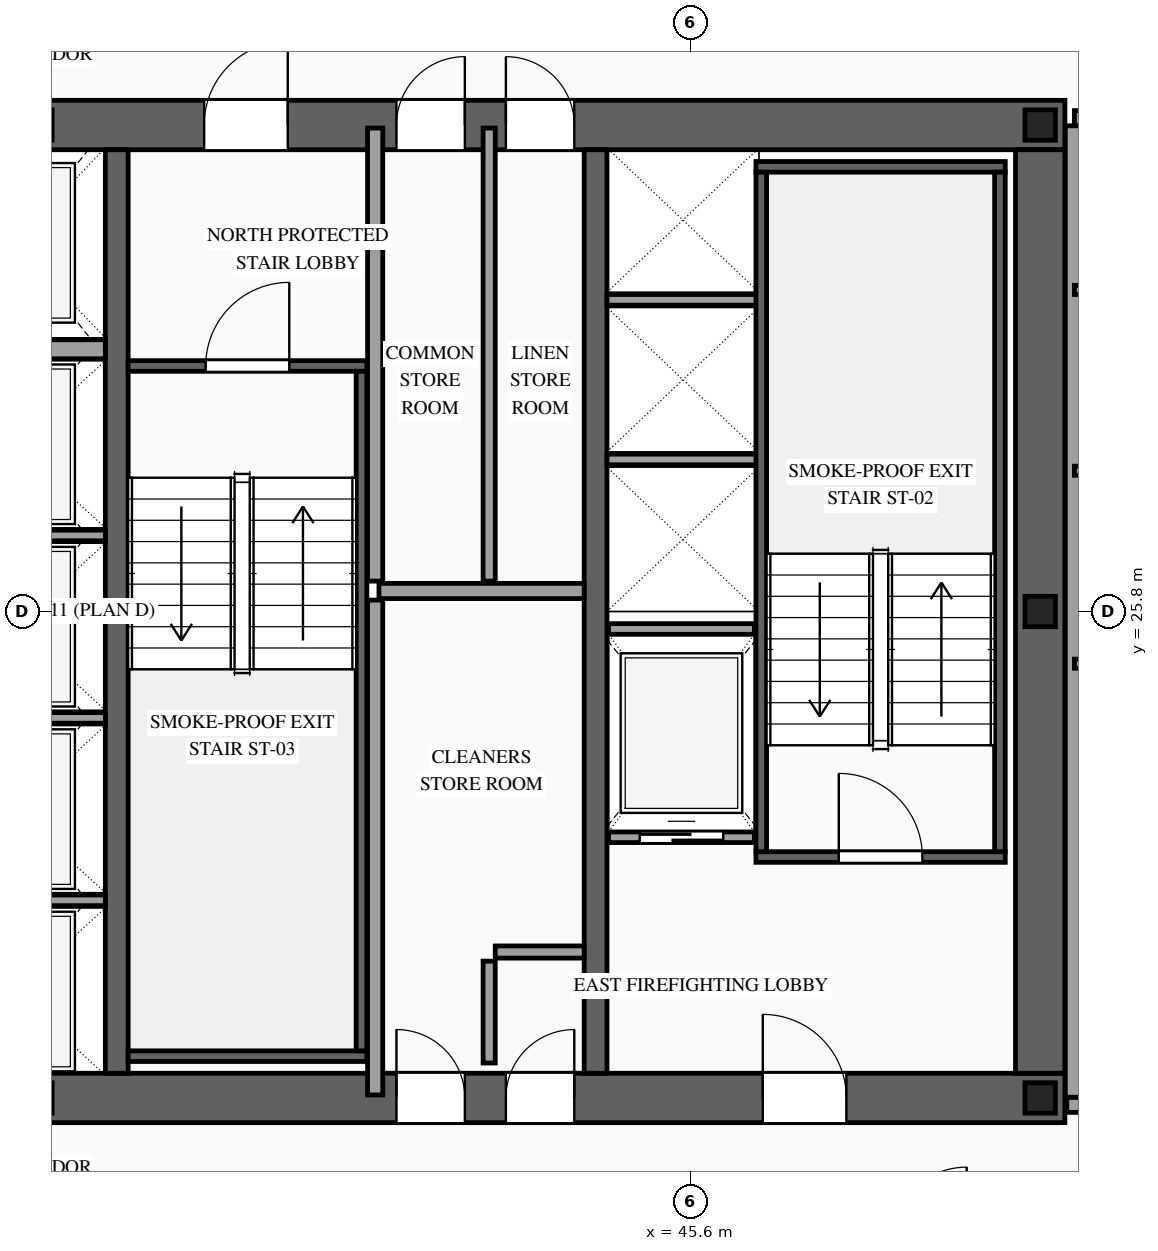
"""IFC4 building model, lengths in metres.
Left out: names, types, materials, properties, quantities, classifications, styles, units other than length and angle.
Written with IfcOpenShell. Run it as: python <this file> out.ifc"""

import sys

from ifc_helpers import new_model, si_unit, direction, frame, frame_2d, origin, origin_2d, place, context, subcontext, project, spatial, rectangle, i_section, extrude, source, transform, mapped, element, fill, save


model = new_model("IFC4")
c1 = context("Model", 3, precision=1e-05, world=origin(), true_north=direction((0.0, 1.0)))
c2 = subcontext(c1, "Body", "Model", "MODEL_VIEW")
j1 = project(units=[si_unit("LENGTHUNIT", "METRE"), si_unit("PLANEANGLEUNIT", "RADIAN")], contexts=[c1])
p1 = place(None, origin())
s1 = spatial("IfcSite", under=j1, at=p1, CompositionType="ELEMENT")
p2 = place(p1, origin())
s2 = spatial("IfcBuilding", under=s1, at=p2, CompositionType="ELEMENT")
p3 = place(p2, frame((0.0, 0.0, 198.5)))
s3 = spatial("IfcBuildingStorey", under=s2, at=p3, CompositionType="ELEMENT", Elevation=198.5)
p4 = place(p3, frame((23.475, 19.4, 0.0), z_axis=(0.0, 0.0, 1.0), x_axis=(1.0, 0.0, 0.0)))
e1 = element("IfcWall", 1, at=p4, inside=s3, PredefinedType="SHEAR", context=c2, shape_type="SweptSolid", body=[
    extrude(rectangle(XDim=27.05, YDim=0.65, at=frame_2d((13.525, 0.0))), origin(), (0.0, 0.0, 1.0), 3.5),
])
p5 = place(p4, frame((1.975, 0.0, 0.0)))
e2 = element("IfcOpeningElement", 2, at=p5, cuts=e1, PredefinedType="OPENING", context=c2, shape_type="SweptSolid", body=[
    extrude(rectangle(XDim=1.1, YDim=2.2, at=frame_2d((0.55, 1.1))), frame((0.0, 0.34, 0.0), z_axis=(0.0, -1.0, 0.0), x_axis=(1.0, 0.0, 0.0)), (0.0, 0.0, 1.0), 0.68),
])
p6 = place(p4, frame((9.875, 0.0, 0.0)))
e3 = element("IfcOpeningElement", 3, at=p6, cuts=e1, PredefinedType="OPENING", context=c2, shape_type="SweptSolid", body=[
    extrude(rectangle(XDim=1.1, YDim=2.2, at=frame_2d((0.55, 1.1))), frame((0.0, 0.34, 0.0), z_axis=(0.0, -1.0, 0.0), x_axis=(1.0, 0.0, 0.0)), (0.0, 0.0, 1.0), 0.68),
])
p7 = place(p4, frame((23.075, 0.0, 0.0)))
e4 = element("IfcOpeningElement", 4, at=p7, cuts=e1, PredefinedType="OPENING", context=c2, shape_type="SweptSolid", body=[
    extrude(rectangle(XDim=1.1, YDim=2.2, at=frame_2d((0.55, 1.1))), frame((0.0, 0.34, 0.0), z_axis=(0.0, -1.0, 0.0), x_axis=(1.0, 0.0, 0.0)), (0.0, 0.0, 1.0), 0.68),
])
p8 = place(p4, frame((19.695, 0.0, 0.0)))
e5 = element("IfcOpeningElement", 5, at=p8, cuts=e1, PredefinedType="OPENING", context=c2, shape_type="SweptSolid", body=[
    extrude(rectangle(XDim=0.9, YDim=2.15, at=frame_2d((0.45, 1.075))), frame((0.0, 0.34, 0.0), z_axis=(0.0, -1.0, 0.0), x_axis=(1.0, 0.0, 0.0)), (0.0, 0.0, 1.0), 0.68),
])
p9 = place(p4, frame((18.255, 0.0, 0.0)))
e6 = element("IfcOpeningElement", 6, at=p9, cuts=e1, PredefinedType="OPENING", context=c2, shape_type="SweptSolid", body=[
    extrude(rectangle(XDim=0.9, YDim=2.15, at=frame_2d((0.45, 1.075))), frame((0.0, 0.34, 0.0), z_axis=(0.0, -1.0, 0.0), x_axis=(1.0, 0.0, 0.0)), (0.0, 0.0, 1.0), 0.68),
])
p10 = place(p3, frame((23.475, 32.2, 0.0), z_axis=(0.0, 0.0, 1.0), x_axis=(1.0, 0.0, 0.0)))
e7 = element("IfcWall", 7, at=p10, inside=s3, PredefinedType="SHEAR", context=c2, shape_type="SweptSolid", body=[
    extrude(rectangle(XDim=27.05, YDim=0.65, at=frame_2d((13.525, 0.0))), origin(), (0.0, 0.0, 1.0), 3.5),
])
p11 = place(p10, frame((4.595, 0.0, 0.0)))
e8 = element("IfcOpeningElement", 8, at=p11, cuts=e7, PredefinedType="OPENING", context=c2, shape_type="SweptSolid", body=[
    extrude(rectangle(XDim=0.9, YDim=2.15, at=frame_2d((0.45, 1.075))), frame((0.0, 0.34, 0.0), z_axis=(0.0, -1.0, 0.0), x_axis=(1.0, 0.0, 0.0)), (0.0, 0.0, 1.0), 0.68),
])
p12 = place(p10, frame((9.875, 0.0, 0.0)))
e9 = element("IfcOpeningElement", 9, at=p12, cuts=e7, PredefinedType="OPENING", context=c2, shape_type="SweptSolid", body=[
    extrude(rectangle(XDim=1.1, YDim=2.2, at=frame_2d((0.55, 1.1))), frame((0.0, 0.34, 0.0), z_axis=(0.0, -1.0, 0.0), x_axis=(1.0, 0.0, 0.0)), (0.0, 0.0, 1.0), 0.68),
])
p13 = place(p10, frame((15.725, 0.0, 0.0)))
e10 = element("IfcOpeningElement", 10, at=p13, cuts=e7, PredefinedType="OPENING", context=c2, shape_type="SweptSolid", body=[
    extrude(rectangle(XDim=1.1, YDim=2.2, at=frame_2d((0.55, 1.1))), frame((0.0, 0.34, 0.0), z_axis=(0.0, -1.0, 0.0), x_axis=(1.0, 0.0, 0.0)), (0.0, 0.0, 1.0), 0.68),
])
p14 = place(p10, frame((18.255, 0.0, 0.0)))
e11 = element("IfcOpeningElement", 11, at=p14, cuts=e7, PredefinedType="OPENING", context=c2, shape_type="SweptSolid", body=[
    extrude(rectangle(XDim=0.9, YDim=2.15, at=frame_2d((0.45, 1.075))), frame((0.0, 0.34, 0.0), z_axis=(0.0, -1.0, 0.0), x_axis=(1.0, 0.0, 0.0)), (0.0, 0.0, 1.0), 0.68),
])
p15 = place(p10, frame((19.695, 0.0, 0.0)))
e12 = element("IfcOpeningElement", 12, at=p15, cuts=e7, PredefinedType="OPENING", context=c2, shape_type="SweptSolid", body=[
    extrude(rectangle(XDim=0.9, YDim=2.15, at=frame_2d((0.45, 1.075))), frame((0.0, 0.34, 0.0), z_axis=(0.0, -1.0, 0.0), x_axis=(1.0, 0.0, 0.0)), (0.0, 0.0, 1.0), 0.68),
])
m1 = source(origin(), c2, "Body", "SweptSolid", [
    extrude(rectangle(XDim=12.15, YDim=0.65, at=frame_2d((6.075, 0.0))), origin(), (0.0, 0.0, 1.0), 3.5),
])
p16 = place(p3, frame((50.2, 19.725, 0.0), z_axis=(0.0, 0.0, 1.0), x_axis=(0.0, 1.0, 0.0)))
e13 = element("IfcWall", 13, at=p16, inside=s3, PredefinedType="SHEAR", context=c2, shape_type="MappedRepresentation", body=[
    mapped(m1, transform((0.0, 0.0, 0.0), scale=1.0)),
])
m2 = source(origin(), c2, "Body", "SweptSolid", [
    extrude(rectangle(XDim=12.15, YDim=0.3, at=frame_2d((6.075, 0.0))), origin(), (0.0, 0.0, 1.0), 3.5),
])
for number, where, z_axis, x_axis in (
    (14, (38.05, 19.725, 0.0), (0.0, 0.0, 1.0), (0.0, 1.0, 0.0)),
    (15, (44.35, 19.725, 0.0), (0.0, 0.0, 1.0), (0.0, 1.0, 0.0)),
):
    element("IfcWall", number, at=place(p3, frame(where, z_axis=z_axis, x_axis=x_axis)), inside=s3, PredefinedType="SOLIDWALL", context=c2, shape_type="MappedRepresentation", body=[
        mapped(m2, transform((0.0, 0.0, 0.0), scale=1.0)),
    ])
m3 = source(origin(), c2, "Body", "SweptSolid", [
    extrude(i_section(OverallWidth=0.4, OverallDepth=0.4, WebThickness=0.013, FlangeThickness=0.021, at=origin_2d()), origin(), (0.0, 0.0, 1.0), 3.5),
])
for number, where, z_axis, x_axis in (
    (16, (50.2, 19.4, 0.0), (0.0, 0.0, 1.0), (1.0, 0.0, 0.0)),
    (17, (50.2, 25.8, 0.0), (0.0, 0.0, 1.0), (1.0, 0.0, 0.0)),
    (18, (50.2, 32.2, 0.0), (0.0, 0.0, 1.0), (1.0, 0.0, 0.0)),
):
    element("IfcColumn", number, at=place(p3, frame(where, z_axis=z_axis, x_axis=x_axis)), inside=s3, PredefinedType="COLUMN", context=c2, shape_type="MappedRepresentation", body=[
        mapped(m3, transform((0.0, 0.0, 0.0), scale=1.0)),
    ])
p17 = place(p3, frame((44.52, 22.83, 0.0), z_axis=(0.0, 0.0, 1.0), x_axis=(1.0, 0.0, 0.0)))
e19 = element("IfcWall", 19, at=p17, inside=s3, PredefinedType="SOLIDWALL", context=c2, shape_type="SweptSolid", body=[
    extrude(rectangle(XDim=1.92, YDim=0.14, at=frame_2d((0.96, 0.0))), origin(), (0.0, 0.0, 1.0), 3.28),
])
p18 = place(p17, frame((0.41, 0.0, 0.0)))
e20 = element("IfcOpeningElement", 20, at=p18, cuts=e19, PredefinedType="OPENING", context=c2, shape_type="SweptSolid", body=[
    extrude(rectangle(XDim=1.1, YDim=2.2, at=frame_2d((0.55, 1.1))), frame((0.0, 0.085, 0.0), z_axis=(0.0, -1.0, 0.0), x_axis=(1.0, 0.0, 0.0)), (0.0, 0.0, 1.0), 0.17),
])
m4 = source(origin(), c2, "Body", "SweptSolid", [
    extrude(rectangle(XDim=1.92, YDim=0.14, at=frame_2d((0.96, 0.0))), origin(), (0.0, 0.0, 1.0), 3.28),
])
p19 = place(p3, frame((44.52, 25.57, 0.0), z_axis=(0.0, 0.0, 1.0), x_axis=(1.0, 0.0, 0.0)))
e21 = element("IfcWall", 21, at=p19, inside=s3, PredefinedType="SOLIDWALL", context=c2, shape_type="MappedRepresentation", body=[
    mapped(m4, transform((0.0, 0.0, 0.0), scale=1.0)),
])
m5 = source(origin(), c2, "Body", "SweptSolid", [
    extrude(rectangle(XDim=2.4, YDim=0.14, at=frame_2d((1.2, 0.0))), origin(), (0.0, 0.0, 1.0), 3.28),
])
for number, where, z_axis, x_axis in (
    (22, (35.5, 22.0, 0.0), (0.0, 0.0, 1.0), (1.0, 0.0, 0.0)),
    (23, (35.5, 24.4, 0.0), (0.0, 0.0, 1.0), (1.0, 0.0, 0.0)),
    (24, (35.5, 26.8, 0.0), (0.0, 0.0, 1.0), (1.0, 0.0, 0.0)),
):
    element("IfcWall", number, at=place(p3, frame(where, z_axis=z_axis, x_axis=x_axis)), inside=s3, PredefinedType="SOLIDWALL", context=c2, shape_type="MappedRepresentation", body=[
        mapped(m5, transform((0.0, 0.0, 0.0), scale=1.0)),
    ])
m6 = source(origin(), c2, "Body", "SweptSolid", [
    extrude(rectangle(XDim=2.4, YDim=0.25, at=frame_2d((1.2, 0.0))), origin(), (0.0, 0.0, 1.0), 3.28),
])
p20 = place(p3, frame((35.5, 29.25, 0.0), z_axis=(0.0, 0.0, 1.0), x_axis=(1.0, 0.0, 0.0)))
e25 = element("IfcWall", 25, at=p20, inside=s3, PredefinedType="SOLIDWALL", context=c2, shape_type="MappedRepresentation", body=[
    mapped(m6, transform((0.0, 0.0, 0.0), scale=1.0)),
])
m7 = source(origin(), c2, "Body", "SweptSolid", [
    extrude(rectangle(XDim=2.0, YDim=0.14, at=frame_2d((1.0, 0.0))), origin(), (0.0, 0.0, 1.0), 3.28),
])
for number, where, z_axis, x_axis in (
    (26, (44.5, 27.8, 0.0), (0.0, 0.0, 1.0), (1.0, 0.0, 0.0)),
    (27, (44.5, 29.9, 0.0), (0.0, 0.0, 1.0), (1.0, 0.0, 0.0)),
):
    element("IfcWall", number, at=place(p3, frame(where, z_axis=z_axis, x_axis=x_axis)), inside=s3, PredefinedType="SOLIDWALL", context=c2, shape_type="MappedRepresentation", body=[
        mapped(m7, transform((0.0, 0.0, 0.0), scale=1.0)),
    ])
p21 = place(p3, frame((46.46, 22.57, 0.0), z_axis=(0.0, 0.0, 1.0), x_axis=(1.0, 0.0, 0.0)))
e28 = element("IfcWall", 28, at=p21, inside=s3, PredefinedType="SOLIDWALL", context=c2, shape_type="SweptSolid", body=[
    extrude(rectangle(XDim=3.28, YDim=0.14, at=frame_2d((1.64, 0.0))), origin(), (0.0, 0.0, 1.0), 3.28),
])
p22 = place(p21, frame((1.09, 0.0, 0.0)))
e29 = element("IfcOpeningElement", 29, at=p22, cuts=e28, PredefinedType="OPENING", context=c2, shape_type="SweptSolid", body=[
    extrude(rectangle(XDim=1.1, YDim=2.2, at=frame_2d((0.55, 1.1))), frame((0.0, 0.085, 0.0), z_axis=(0.0, -1.0, 0.0), x_axis=(1.0, 0.0, 0.0)), (0.0, 0.0, 1.0), 0.17),
])
m8 = source(origin(), c2, "Body", "SweptSolid", [
    extrude(rectangle(XDim=3.28, YDim=0.14, at=frame_2d((1.64, 0.0))), origin(), (0.0, 0.0, 1.0), 3.28),
])
p23 = place(p3, frame((46.46, 31.65, 0.0), z_axis=(0.0, 0.0, 1.0), x_axis=(1.0, 0.0, 0.0)))
e30 = element("IfcWall", 30, at=p23, inside=s3, PredefinedType="SOLIDWALL", context=c2, shape_type="MappedRepresentation", body=[
    mapped(m8, transform((0.0, 0.0, 0.0), scale=1.0)),
])
m9 = source(origin(), c2, "Body", "SweptSolid", [
    extrude(rectangle(XDim=8.94, YDim=0.14, at=frame_2d((4.47, 0.0))), origin(), (0.0, 0.0, 1.0), 3.28),
])
for number, where, z_axis, x_axis in (
    (31, (46.53, 22.64, 0.0), (0.0, 0.0, 1.0), (0.0, 1.0, 0.0)),
    (32, (49.67, 22.64, 0.0), (0.0, 0.0, 1.0), (0.0, 1.0, 0.0)),
):
    element("IfcWall", number, at=place(p3, frame(where, z_axis=z_axis, x_axis=x_axis)), inside=s3, PredefinedType="SOLIDWALL", context=c2, shape_type="MappedRepresentation", body=[
        mapped(m9, transform((0.0, 0.0, 0.0), scale=1.0)),
    ])
p24 = place(p3, frame((38.2, 29.03, 0.0), z_axis=(0.0, 0.0, 1.0), x_axis=(1.0, 0.0, 0.0)))
e33 = element("IfcWall", 33, at=p24, inside=s3, PredefinedType="SOLIDWALL", context=c2, shape_type="SweptSolid", body=[
    extrude(rectangle(XDim=3.14, YDim=0.14, at=frame_2d((1.57, 0.0))), origin(), (0.0, 0.0, 1.0), 3.28),
])
p25 = place(p24, frame((1.02, 0.0, 0.0)))
e34 = element("IfcOpeningElement", 34, at=p25, cuts=e33, PredefinedType="OPENING", context=c2, shape_type="SweptSolid", body=[
    extrude(rectangle(XDim=1.1, YDim=2.2, at=frame_2d((0.55, 1.1))), frame((0.0, 0.085, 0.0), z_axis=(0.0, -1.0, 0.0), x_axis=(1.0, 0.0, 0.0)), (0.0, 0.0, 1.0), 0.17),
])
m10 = source(origin(), c2, "Body", "SweptSolid", [
    extrude(rectangle(XDim=3.14, YDim=0.14, at=frame_2d((1.57, 0.0))), origin(), (0.0, 0.0, 1.0), 3.28),
])
p26 = place(p3, frame((38.2, 19.95, 0.0), z_axis=(0.0, 0.0, 1.0), x_axis=(1.0, 0.0, 0.0)))
e35 = element("IfcWall", 35, at=p26, inside=s3, PredefinedType="SOLIDWALL", context=c2, shape_type="MappedRepresentation", body=[
    mapped(m10, transform((0.0, 0.0, 0.0), scale=1.0)),
])
m11 = source(origin(), c2, "Body", "SweptSolid", [
    extrude(rectangle(XDim=8.94, YDim=0.14, at=frame_2d((4.47, 0.0))), origin(), (0.0, 0.0, 1.0), 3.28),
])
p27 = place(p3, frame((41.27, 20.02, 0.0), z_axis=(0.0, 0.0, 1.0), x_axis=(0.0, 1.0, 0.0)))
e36 = element("IfcWall", 36, at=p27, inside=s3, PredefinedType="SOLIDWALL", context=c2, shape_type="MappedRepresentation", body=[
    mapped(m11, transform((0.0, 0.0, 0.0), scale=1.0)),
])
m12 = source(origin(), c2, "Body", "SweptSolid", [
    extrude(rectangle(XDim=1.34, YDim=0.16, at=frame_2d((0.67, 0.0))), origin(), (0.0, 0.0, 1.0), 3.28),
])
p28 = place(p3, frame((42.95, 19.86, 0.0), z_axis=(0.0, 0.0, 1.0), x_axis=(0.0, 1.0, 0.0)))
e37 = element("IfcWall", 37, at=p28, inside=s3, PredefinedType="PARTITIONING", context=c2, shape_type="MappedRepresentation", body=[
    mapped(m12, transform((0.0, 0.0, 0.0), scale=1.0)),
])
m13 = source(origin(), c2, "Body", "SweptSolid", [
    extrude(rectangle(XDim=1.17, YDim=0.16, at=frame_2d((0.585, 0.0))), origin(), (0.0, 0.0, 1.0), 3.28),
])
p29 = place(p3, frame((43.03, 21.32, 0.0), z_axis=(0.0, 0.0, 1.0), x_axis=(1.0, 0.0, 0.0)))
e38 = element("IfcWall", 38, at=p29, inside=s3, PredefinedType="PARTITIONING", context=c2, shape_type="MappedRepresentation", body=[
    mapped(m13, transform((0.0, 0.0, 0.0), scale=1.0)),
])
m14 = source(origin(), c2, "Body", "SweptSolid", [
    extrude(rectangle(XDim=6.51, YDim=0.2, at=frame_2d((3.255, 0.0))), origin(), (0.0, 0.0, 1.0), 3.28),
])
p30 = place(p3, frame((41.45, 19.44, 0.0), z_axis=(0.0, 0.0, 1.0), x_axis=(0.0, 1.0, 0.0)))
e39 = element("IfcWall", 39, at=p30, inside=s3, PredefinedType="PARTITIONING", context=c2, shape_type="MappedRepresentation", body=[
    mapped(m14, transform((0.0, 0.0, 0.0), scale=1.0)),
])
m15 = source(origin(), c2, "Body", "SweptSolid", [
    extrude(rectangle(XDim=2.7, YDim=0.2, at=frame_2d((1.35, 0.0))), origin(), (0.0, 0.0, 1.0), 3.28),
])
p31 = place(p3, frame((41.5, 26.07, 0.0), z_axis=(0.0, 0.0, 1.0), x_axis=(1.0, 0.0, 0.0)))
e40 = element("IfcWall", 40, at=p31, inside=s3, PredefinedType="PARTITIONING", context=c2, shape_type="MappedRepresentation", body=[
    mapped(m15, transform((0.0, 0.0, 0.0), scale=1.0)),
])
m16 = source(origin(), c2, "Body", "SweptSolid", [
    extrude(rectangle(XDim=5.96, YDim=0.2, at=frame_2d((2.98, 0.0))), origin(), (0.0, 0.0, 1.0), 3.28),
])
p32 = place(p3, frame((41.45, 26.2, 0.0), z_axis=(0.0, 0.0, 1.0), x_axis=(0.0, 1.0, 0.0)))
e41 = element("IfcWall", 41, at=p32, inside=s3, PredefinedType="PARTITIONING", context=c2, shape_type="MappedRepresentation", body=[
    mapped(m16, transform((0.0, 0.0, 0.0), scale=1.0)),
])
m17 = source(origin(), c2, "Body", "SweptSolid", [
    extrude(rectangle(XDim=5.96, YDim=0.16, at=frame_2d((2.98, 0.0))), origin(), (0.0, 0.0, 1.0), 3.28),
])
p33 = place(p3, frame((42.95, 26.2, 0.0), z_axis=(0.0, 0.0, 1.0), x_axis=(0.0, 1.0, 0.0)))
e42 = element("IfcWall", 42, at=p33, inside=s3, PredefinedType="PARTITIONING", context=c2, shape_type="MappedRepresentation", body=[
    mapped(m17, transform((0.0, 0.0, 0.0), scale=1.0)),
])
p34 = place(p3, frame((50.65, 32.29, 0.0), z_axis=(0.0, 0.0, 1.0), x_axis=(1.0, 0.0, 0.0)))
e43 = element("IfcWall", 43, at=p34, inside=s3, PredefinedType="PARTITIONING", context=c2, shape_type="SweptSolid", body=[
    extrude(rectangle(XDim=8.3, YDim=0.2, at=frame_2d((4.15, 0.0))), origin(), (0.0, 0.0, 1.0), 2.775),
])
p35 = place(p34, frame((3.585, 0.0, 0.0)))
e44 = element("IfcOpeningElement", 44, at=p35, cuts=e43, PredefinedType="OPENING", context=c2, shape_type="SweptSolid", body=[
    extrude(rectangle(XDim=1.0, YDim=2.2, at=frame_2d((0.5, 1.1))), frame((0.0, 0.115, 0.0), z_axis=(0.0, -1.0, 0.0), x_axis=(1.0, 0.0, 0.0)), (0.0, 0.0, 1.0), 0.23),
])
m18 = source(origin(), c2, "Body", "SweptSolid", [
    extrude(rectangle(XDim=8.4, YDim=0.2, at=frame_2d((4.2, 0.0))), origin(), (0.0, 0.0, 1.0), 2.775),
])
p36 = place(p3, frame((50.55, 19.31, 0.0), z_axis=(0.0, 0.0, 1.0), x_axis=(1.0, 0.0, 0.0)))
e45 = element("IfcWall", 45, at=p36, inside=s3, PredefinedType="PARTITIONING", context=c2, shape_type="MappedRepresentation", body=[
    mapped(m18, transform((0.0, 0.0, 0.0), scale=1.0)),
])
m19 = source(origin(), c2, "Body", "SweptSolid", [
    extrude(rectangle(XDim=12.78, YDim=0.2, at=frame_2d((6.39, 0.0))), origin(), (0.0, 0.0, 1.0), 3.28),
])
p37 = place(p3, frame((50.63, 19.41, 0.0), z_axis=(0.0, 0.0, 1.0), x_axis=(0.0, 1.0, 0.0)))
e46 = element("IfcWall", 46, at=p37, inside=s3, PredefinedType="PARTITIONING", context=c2, shape_type="MappedRepresentation", body=[
    mapped(m19, transform((0.0, 0.0, 0.0), scale=1.0)),
])
m20 = source(origin(), c2, "Body", "SweptSolid", [
    extrude(rectangle(XDim=2.75, YDim=0.12, at=frame_2d((1.375, 0.0))), origin(), (0.0, 0.0, 1.0), 3.28),
])
for number, where, z_axis, x_axis in (
    (47, (50.65, 25.113, 0.0), (0.0, 0.0, 1.0), (1.0, 0.0, 0.0)),
    (48, (50.65, 27.652, 0.0), (0.0, 0.0, 1.0), (1.0, 0.0, 0.0)),
    (49, (50.65, 30.031, 0.0), (0.0, 0.0, 1.0), (1.0, 0.0, 0.0)),
):
    element("IfcWall", number, at=place(p3, frame(where, z_axis=z_axis, x_axis=x_axis)), inside=s3, PredefinedType="PARTITIONING", context=c2, shape_type="MappedRepresentation", body=[
        mapped(m20, transform((0.0, 0.0, 0.0), scale=1.0)),
    ])
m21 = source(origin(), c2, "Body", "SweptSolid", [
    extrude(rectangle(XDim=1.1, YDim=2.2, at=frame_2d((0.55, 1.1))), frame((0.0, 0.025, 0.0), z_axis=(0.0, -1.0, 0.0), x_axis=(1.0, 0.0, 0.0)), (0.0, 0.0, 1.0), 0.05),
])
p38 = place(p18, origin())
e50 = element("IfcDoor", 50, at=p38, inside=s3, OperationType="SLIDING_TO_RIGHT", PredefinedType="DOOR", context=c2, shape_type="MappedRepresentation", body=[
    mapped(m21, transform((0.0, 0.0, 0.0), scale=1.0)),
])
fill(e20, e50)
m22 = source(origin(), c2, "Body", "SweptSolid", [
    extrude(rectangle(XDim=1.1, YDim=2.2, at=frame_2d((0.55, 1.1))), frame((0.0, 0.025, 0.0), z_axis=(0.0, -1.0, 0.0), x_axis=(1.0, 0.0, 0.0)), (0.0, 0.0, 1.0), 0.05),
])
p39 = place(p22, origin())
e51 = element("IfcDoor", 51, at=p39, inside=s3, OperationType="SINGLE_SWING_LEFT", PredefinedType="DOOR", context=c2, shape_type="MappedRepresentation", body=[
    mapped(m22, transform((0.0, 0.0, 0.0), scale=1.0)),
])
fill(e29, e51)
p40 = place(p25, origin())
e52 = element("IfcDoor", 52, at=p40, inside=s3, OperationType="SINGLE_SWING_RIGHT", PredefinedType="DOOR", context=c2, shape_type="MappedRepresentation", body=[
    mapped(m22, transform((0.0, 0.0, 0.0), scale=1.0)),
])
fill(e34, e52)
p41 = place(p7, origin())
e53 = element("IfcDoor", 53, at=p41, inside=s3, OperationType="SINGLE_SWING_LEFT", PredefinedType="DOOR", context=c2, shape_type="MappedRepresentation", body=[
    mapped(m22, transform((0.0, 0.0, 0.0), scale=1.0)),
])
fill(e4, e53)
p42 = place(p13, origin())
e54 = element("IfcDoor", 54, at=p42, inside=s3, OperationType="SINGLE_SWING_RIGHT", PredefinedType="DOOR", context=c2, shape_type="MappedRepresentation", body=[
    mapped(m22, transform((0.0, 0.0, 0.0), scale=1.0)),
])
fill(e10, e54)
m23 = source(origin(), c2, "Body", "SweptSolid", [
    extrude(rectangle(XDim=0.9, YDim=2.15, at=frame_2d((0.45, 1.075))), frame((0.0, 0.025, 0.0), z_axis=(0.0, -1.0, 0.0), x_axis=(1.0, 0.0, 0.0)), (0.0, 0.0, 1.0), 0.05),
])
p43 = place(p8, origin())
e55 = element("IfcDoor", 55, at=p43, inside=s3, OperationType="SINGLE_SWING_RIGHT", PredefinedType="DOOR", context=c2, shape_type="MappedRepresentation", body=[
    mapped(m23, transform((0.0, 0.0, 0.0), scale=1.0)),
])
fill(e5, e55)
p44 = place(p9, origin())
e56 = element("IfcDoor", 56, at=p44, inside=s3, OperationType="SINGLE_SWING_LEFT", PredefinedType="DOOR", context=c2, shape_type="MappedRepresentation", body=[
    mapped(m23, transform((0.0, 0.0, 0.0), scale=1.0)),
])
fill(e6, e56)
p45 = place(p14, origin())
e57 = element("IfcDoor", 57, at=p45, inside=s3, OperationType="SINGLE_SWING_RIGHT", PredefinedType="DOOR", context=c2, shape_type="MappedRepresentation", body=[
    mapped(m23, transform((0.0, 0.0, 0.0), scale=1.0)),
])
fill(e11, e57)
p46 = place(p15, origin())
e58 = element("IfcDoor", 58, at=p46, inside=s3, OperationType="SINGLE_SWING_LEFT", PredefinedType="DOOR", context=c2, shape_type="MappedRepresentation", body=[
    mapped(m23, transform((0.0, 0.0, 0.0), scale=1.0)),
])
fill(e12, e58)
save(model, sys.argv[1])
